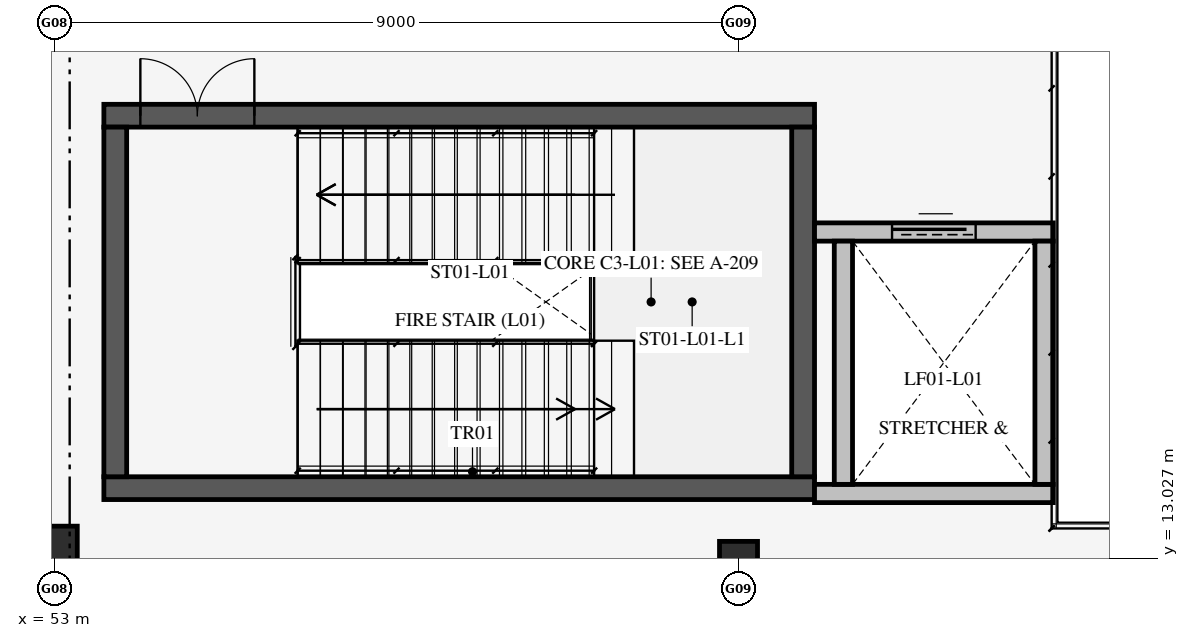
"""IFC4 building model, lengths in metres.
Left out: names, types, materials, properties, quantities, classifications, styles, units other than length and angle.
Written with IfcOpenShell. Run it as: python <this file> out.ifc"""

import sys

from ifc_helpers import new_model, si_unit, direction, frame, frame_2d, origin, origin_2d, place, context, subcontext, project, spatial, rectangle, circle, extrude, element, fill, save


model = new_model("IFC4")
c1 = context("Model", 3, precision=1e-05, world=origin(), true_north=direction((0.0, 1.0)))
c2 = subcontext(c1, "Body", "Model", "MODEL_VIEW")
j1 = project(units=[si_unit("LENGTHUNIT", "METRE"), si_unit("PLANEANGLEUNIT", "RADIAN")], contexts=[c1])
p1 = place(None, origin())
s1 = spatial("IfcSite", under=j1, at=p1, CompositionType="ELEMENT")
p2 = place(p1, origin())
s2 = spatial("IfcBuilding", under=s1, at=p2, CompositionType="ELEMENT")
p3 = place(p2, frame((0.0, 0.0, 5.4)))
s3 = spatial("IfcBuildingStorey", under=s2, at=p3, CompositionType="ELEMENT", Elevation=5.4)
p4 = place(p3, frame((53.65, 13.95, 0.0), z_axis=(0.0, 0.0, 1.0), x_axis=(1.0, 0.0, 0.0)))
e1 = element("IfcWall", 1, at=p4, inside=s3, PredefinedType="SHEAR", context=c2, shape_type="SweptSolid", body=[
    extrude(rectangle(XDim=9.35, YDim=0.3, at=frame_2d((4.675, 0.0))), origin(), (0.0, 0.0, 1.0), 4.56),
])
p5 = place(p3, frame((53.65, 18.85, 0.0), z_axis=(0.0, 0.0, 1.0), x_axis=(1.0, 0.0, 0.0)))
e2 = element("IfcWall", 2, at=p5, inside=s3, PredefinedType="SHEAR", context=c2, shape_type="SweptSolid", body=[
    extrude(rectangle(XDim=9.35, YDim=0.3, at=frame_2d((4.675, 0.0))), origin(), (0.0, 0.0, 1.0), 4.56),
])
p6 = place(p5, frame((0.48, 0.0, 0.0)))
e3 = element("IfcOpeningElement", 3, at=p6, cuts=e2, PredefinedType="OPENING", context=c2, shape_type="SweptSolid", body=[
    extrude(rectangle(XDim=1.5, YDim=2.3, at=frame_2d((0.75, 1.15))), frame((0.0, 0.162, 0.0), z_axis=(0.0, -1.0, 0.0), x_axis=(1.0, 0.0, 0.0)), (0.0, 0.0, 1.0), 0.324),
])
for number, where, z_axis, x_axis in (
    (4, (53.8, 14.1, 0.0), (0.0, 0.0, 1.0), (0.0, 1.0, 0.0)),
    (5, (62.85, 14.1, 0.0), (0.0, 0.0, 1.0), (0.0, 1.0, 0.0)),
):
    element("IfcWall", number, at=place(p3, frame(where, z_axis=z_axis, x_axis=x_axis)), inside=s3, PredefinedType="SHEAR", context=c2, shape_type="SweptSolid", body=[
        extrude(rectangle(XDim=4.6, YDim=0.3, at=frame_2d((2.3, 0.0))), origin(), (0.0, 0.0, 1.0), 4.56),
    ])
p7 = place(p3, frame((63.0, 13.88, 0.0), z_axis=(0.0, 0.0, 1.0), x_axis=(1.0, 0.0, 0.0)))
e6 = element("IfcWall", 6, at=p7, inside=s3, PredefinedType="SOLIDWALL", context=c2, shape_type="SweptSolid", body=[
    extrude(rectangle(XDim=3.14, YDim=0.24, at=frame_2d((1.57, 0.0))), origin(), (0.0, 0.0, 1.0), 4.8),
])
p8 = place(p3, frame((63.0, 17.32, 0.0), z_axis=(0.0, 0.0, 1.0), x_axis=(1.0, 0.0, 0.0)))
e7 = element("IfcWall", 7, at=p8, inside=s3, PredefinedType="SOLIDWALL", context=c2, shape_type="SweptSolid", body=[
    extrude(rectangle(XDim=3.14, YDim=0.24, at=frame_2d((1.57, 0.0))), origin(), (0.0, 0.0, 1.0), 4.8),
])
p9 = place(p8, frame((1.02, 0.0, 0.0)))
e8 = element("IfcOpeningElement", 8, at=p9, cuts=e7, PredefinedType="OPENING", context=c2, shape_type="SweptSolid", body=[
    extrude(rectangle(XDim=1.1, YDim=2.15, at=frame_2d((0.55, 1.075))), frame((0.0, 0.132, 0.0), z_axis=(0.0, -1.0, 0.0), x_axis=(1.0, 0.0, 0.0)), (0.0, 0.0, 1.0), 0.264),
])
for number, where, z_axis, x_axis in (
    (9, (63.38, 14.0, 0.0), (0.0, 0.0, 1.0), (0.0, 1.0, 0.0)),
    (10, (66.02, 14.0, 0.0), (0.0, 0.0, 1.0), (0.0, 1.0, 0.0)),
):
    element("IfcWall", number, at=place(p3, frame(where, z_axis=z_axis, x_axis=x_axis)), inside=s3, PredefinedType="SOLIDWALL", context=c2, shape_type="SweptSolid", body=[
        extrude(rectangle(XDim=3.2, YDim=0.24, at=frame_2d((1.6, 0.0))), origin(), (0.0, 0.0, 1.0), 4.8),
    ])
p10 = place(p3, frame((53.0, 13.0, 0.0), z_axis=(0.0, 0.0, 1.0), x_axis=(1.0, 0.0, 0.0)))
e11 = element("IfcColumn", 11, at=p10, inside=s3, PredefinedType="COLUMN", context=c2, shape_type="SweptSolid", body=[
    extrude(rectangle(XDim=0.6, YDim=0.9, at=origin_2d()), origin(), (0.0, 0.0, 1.0), 4.8),
])
p11 = place(p3, frame((62.0, 13.0, 0.0), z_axis=(0.0, 0.0, 1.0), x_axis=(1.0, 0.0, 0.0)))
e12 = element("IfcColumn", 12, at=p11, inside=s3, PredefinedType="COLUMN", context=c2, shape_type="SweptSolid", body=[
    extrude(circle(Radius=0.25, at=origin_2d()), origin(), (0.0, 0.0, 1.0), 4.8),
])
p12 = place(p6, frame((1.5, 0.0, 0.0), z_axis=(0.0, 0.0, 1.0), x_axis=(-1.0, 0.0, 0.0)))
e13 = element("IfcDoor", 13, at=p12, inside=s3, OperationType="DOUBLE_DOOR_SINGLE_SWING", PredefinedType="DOOR", context=c2, shape_type="SweptSolid", body=[
    extrude(rectangle(XDim=1.5, YDim=2.3, at=frame_2d((0.75, 1.15))), frame((0.0, 0.025, 0.0), z_axis=(0.0, -1.0, 0.0), x_axis=(1.0, 0.0, 0.0)), (0.0, 0.0, 1.0), 0.05),
])
fill(e3, e13)
p13 = place(p9, origin())
e14 = element("IfcDoor", 14, at=p13, inside=s3, OperationType="SLIDING_TO_LEFT", PredefinedType="USERDEFINED", context=c2, shape_type="SweptSolid", body=[
    extrude(rectangle(XDim=1.1, YDim=2.15, at=frame_2d((0.55, 1.075))), frame((0.0, 0.025, 0.0), z_axis=(0.0, -1.0, 0.0), x_axis=(1.0, 0.0, 0.0)), (0.0, 0.0, 1.0), 0.05),
])
fill(e8, e14)
save(model, sys.argv[1])
